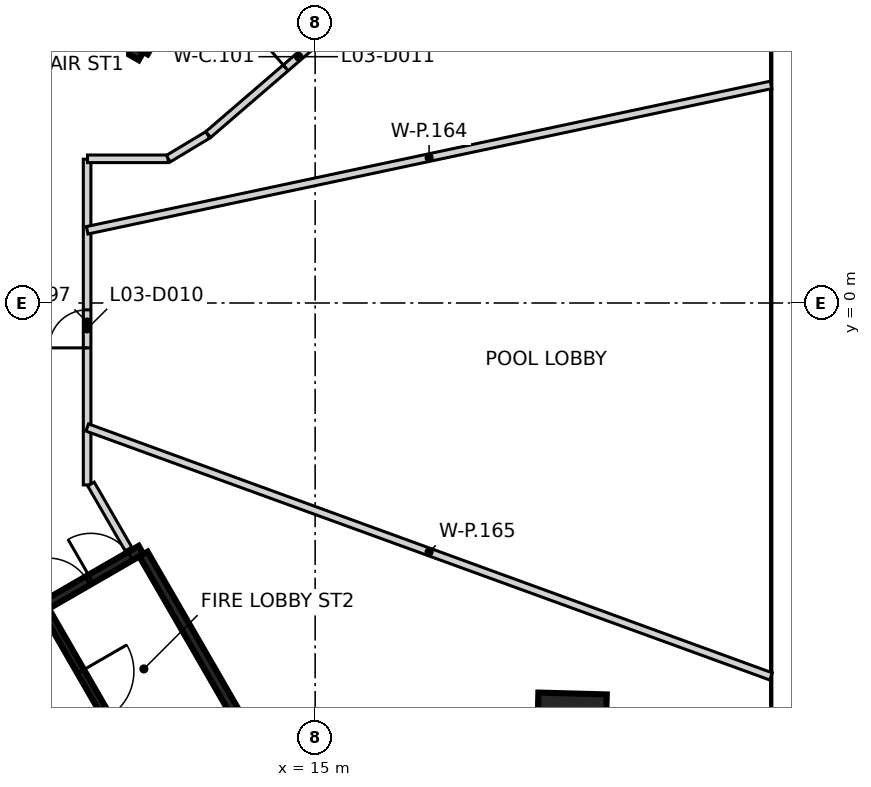
"""IFC4 building model, lengths in metres.
Left out: names, types, materials, properties, quantities, classifications, styles, units other than length and angle.
Written with IfcOpenShell. Run it as: python <this file> out.ifc"""

import sys

from ifc_helpers import new_model, si_unit, direction, frame, frame_2d, origin, origin_2d, place, context, subcontext, project, spatial, rectangle, extrude, element, fill, save


model = new_model("IFC4")
c1 = context("Model", 3, precision=1e-05, world=origin(), true_north=direction((0.0, 1.0)))
c2 = subcontext(c1, "Body", "Model", "MODEL_VIEW")
j1 = project(units=[si_unit("LENGTHUNIT", "METRE"), si_unit("PLANEANGLEUNIT", "RADIAN")], contexts=[c1])
p1 = place(None, origin())
s1 = spatial("IfcSite", under=j1, at=p1, CompositionType="ELEMENT")
p2 = place(p1, origin())
s2 = spatial("IfcBuilding", under=s1, at=p2, CompositionType="ELEMENT")
p3 = place(p2, frame((0.0, 0.0, 19.5)))
s3 = spatial("IfcBuildingStorey", under=s2, at=p3, CompositionType="ELEMENT", Elevation=19.5)
p4 = place(p3, frame((21.749, -11.174, -0.35), z_axis=(0.0, 0.0, 1.0), x_axis=(-0.999628128016, 0.02726913418, 0.0)))
e1 = element("IfcColumn", 1, at=p4, inside=s3, PredefinedType="COLUMN", context=c2, shape_type="SweptSolid", body=[
    extrude(rectangle(XDim=1.8, YDim=1.8, at=origin_2d()), origin(), (0.0, 0.0, 1.0), 2.5),
])
p5 = place(p3, frame((10.42, 6.498, 0.0), z_axis=(0.0, 0.0, 1.0), x_axis=(-0.866021906294, 0.500006057782, 0.0)))
e2 = element("IfcWall", 2, at=p5, inside=s3, PredefinedType="SHEAR", context=c2, shape_type="SweptSolid", body=[
    extrude(rectangle(XDim=11.55, YDim=0.25, at=frame_2d((5.775, 0.0))), origin(), (0.0, 0.0, 1.0), 4.55),
])
p6 = place(p5, frame((10.025, 0.0, 0.0)))
e3 = element("IfcOpeningElement", 3, at=p6, cuts=e2, PredefinedType="OPENING", context=c2, shape_type="SweptSolid", body=[
    extrude(rectangle(XDim=1.2, YDim=2.1, at=frame_2d((0.6, 1.05))), frame((0.0, 0.135, 0.0), z_axis=(0.0, -1.0, 0.0), x_axis=(1.0, 0.0, 0.0)), (0.0, 0.0, 1.0), 0.27),
])
p7 = place(p5, frame((8.725, 0.0, 0.0)))
e4 = element("IfcOpeningElement", 4, at=p7, cuts=e2, PredefinedType="OPENING", context=c2, shape_type="SweptSolid", body=[
    extrude(rectangle(XDim=1.2, YDim=2.1, at=frame_2d((0.6, 1.05))), frame((0.0, 0.135, 0.0), z_axis=(0.0, -1.0, 0.0), x_axis=(1.0, 0.0, 0.0)), (0.0, 0.0, 1.0), 0.27),
])
p8 = place(p3, frame((13.238, 11.378, 0.0), z_axis=(0.0, 0.0, 1.0), x_axis=(-0.500008851346, -0.866020293397, 0.0)))
e5 = element("IfcWall", 5, at=p8, inside=s3, PredefinedType="SHEAR", context=c2, shape_type="SweptSolid", body=[
    extrude(rectangle(XDim=5.51, YDim=0.25, at=frame_2d((2.755, 0.0))), origin(), (0.0, 0.0, 1.0), 4.55),
])
p9 = place(p3, frame((0.417, -12.273, 0.0), z_axis=(0.0, 0.0, 1.0), x_axis=(0.866021906294, 0.500006057782, 0.0)))
e6 = element("IfcWall", 6, at=p9, inside=s3, PredefinedType="SHEAR", context=c2, shape_type="SweptSolid", body=[
    extrude(rectangle(XDim=11.55, YDim=0.25, at=frame_2d((5.775, 0.0))), origin(), (0.0, 0.0, 1.0), 4.55),
])
p10 = place(p9, frame((10.025, 0.0, 0.0)))
e7 = element("IfcOpeningElement", 7, at=p10, cuts=e6, PredefinedType="OPENING", context=c2, shape_type="SweptSolid", body=[
    extrude(rectangle(XDim=1.2, YDim=2.1, at=frame_2d((0.6, 1.05))), frame((0.0, 0.135, 0.0), z_axis=(0.0, -1.0, 0.0), x_axis=(1.0, 0.0, 0.0)), (0.0, 0.0, 1.0), 0.27),
])
p11 = place(p9, frame((8.725, 0.0, 0.0)))
e8 = element("IfcOpeningElement", 8, at=p11, cuts=e6, PredefinedType="OPENING", context=c2, shape_type="SweptSolid", body=[
    extrude(rectangle(XDim=1.2, YDim=2.1, at=frame_2d((0.6, 1.05))), frame((0.0, 0.135, 0.0), z_axis=(0.0, -1.0, 0.0), x_axis=(1.0, 0.0, 0.0)), (0.0, 0.0, 1.0), 0.27),
])
p12 = place(p3, frame((10.483, -6.606, 0.0), z_axis=(0.0, 0.0, 1.0), x_axis=(0.49999885962, -0.866026062182, 0.0)))
e9 = element("IfcWall", 9, at=p12, inside=s3, PredefinedType="SHEAR", context=c2, shape_type="SweptSolid", body=[
    extrude(rectangle(XDim=5.225, YDim=0.25, at=frame_2d((2.612, 0.0))), origin(), (0.0, 0.0, 1.0), 4.55),
])
p13 = place(p3, frame((7.906, -8.094, 0.0), z_axis=(0.0, 0.0, 1.0), x_axis=(0.500024287448, -0.866011380966, 0.0)))
e10 = element("IfcWall", 10, at=p13, inside=s3, PredefinedType="SHEAR", context=c2, shape_type="SweptSolid", body=[
    extrude(rectangle(XDim=5.251, YDim=0.2, at=frame_2d((2.625, 0.0))), origin(), (0.0, 0.0, 1.0), 4.55),
])
p14 = place(p13, frame((1.849, 0.0, 0.0)))
e11 = element("IfcOpeningElement", 11, at=p14, cuts=e10, PredefinedType="OPENING", context=c2, shape_type="SweptSolid", body=[
    extrude(rectangle(XDim=1.4, YDim=2.1, at=frame_2d((0.7, 1.05))), frame((0.0, 0.11, 0.0), z_axis=(0.0, -1.0, 0.0), x_axis=(1.0, 0.0, 0.0)), (0.0, 0.0, 1.0), 0.22),
])
p15 = place(p3, frame((9.0, -4.787, 0.0), z_axis=(0.0, 0.0, 1.0), x_axis=(0.0, 1.0, 0.0)))
e12 = element("IfcWall", 12, at=p15, inside=s3, PredefinedType="PARTITIONING", context=c2, shape_type="SweptSolid", body=[
    extrude(rectangle(XDim=8.571, YDim=0.2, at=frame_2d((4.286, 0.0))), origin(), (0.0, 0.0, 1.0), 4.55),
])
p16 = place(p15, frame((3.606, 0.0, 0.0)))
e13 = element("IfcOpeningElement", 13, at=p16, cuts=e12, PredefinedType="OPENING", context=c2, shape_type="SweptSolid", body=[
    extrude(rectangle(XDim=1.0, YDim=2.1, at=frame_2d((0.5, 1.05))), frame((0.0, 0.11, 0.0), z_axis=(0.0, -1.0, 0.0), x_axis=(1.0, 0.0, 0.0)), (0.0, 0.0, 1.0), 0.22),
])
p17 = place(p3, frame((9.01, 3.794, 0.0), z_axis=(0.0, 0.0, 1.0), x_axis=(1.0, 0.0, 0.0)))
e14 = element("IfcWall", 14, at=p17, inside=s3, PredefinedType="PARTITIONING", context=c2, shape_type="SweptSolid", body=[
    extrude(rectangle(XDim=2.122, YDim=0.2, at=frame_2d((1.061, 0.0))), origin(), (0.0, 0.0, 1.0), 4.55),
])
p18 = place(p3, frame((9.101, -4.763, 0.0), z_axis=(0.0, 0.0, 1.0), x_axis=(0.500150029396, -0.865938766944, 0.0)))
e15 = element("IfcWall", 15, at=p18, inside=s3, PredefinedType="PARTITIONING", context=c2, shape_type="SweptSolid", body=[
    extrude(rectangle(XDim=1.977, YDim=0.2, at=frame_2d((0.989, 0.0))), origin(), (0.0, 0.0, 1.0), 4.55),
])
p19 = place(p3, frame((11.136, 3.797, 0.0), z_axis=(0.0, 0.0, 1.0), x_axis=(0.856568110317, 0.516033983753, 0.0)))
e16 = element("IfcWall", 16, at=p19, inside=s3, PredefinedType="PARTITIONING", context=c2, shape_type="SweptSolid", body=[
    extrude(rectangle(XDim=1.213, YDim=0.2, at=frame_2d((0.606, 0.0))), origin(), (0.0, 0.0, 1.0), 4.55),
])
p20 = place(p3, frame((12.187, 4.433, 0.0), z_axis=(0.0, 0.0, 1.0), x_axis=(0.757945584444, 0.652317783769, 0.0)))
e17 = element("IfcWall", 17, at=p20, inside=s3, PredefinedType="PARTITIONING", context=c2, shape_type="SweptSolid", body=[
    extrude(rectangle(XDim=6.278, YDim=0.2, at=frame_2d((3.139, 0.0))), origin(), (0.0, 0.0, 1.0), 4.55),
])
p21 = place(p20, frame((2.689, 0.0, 0.0)))
e18 = element("IfcOpeningElement", 18, at=p21, cuts=e17, PredefinedType="OPENING", context=c2, shape_type="SweptSolid", body=[
    extrude(rectangle(XDim=0.9, YDim=2.1, at=frame_2d((0.45, 1.05))), frame((0.0, 0.11, 0.0), z_axis=(0.0, -1.0, 0.0), x_axis=(1.0, 0.0, 0.0)), (0.0, 0.0, 1.0), 0.22),
])
p22 = place(p3, frame((9.002, 1.913, 0.0), z_axis=(0.0, 0.0, 1.0), x_axis=(0.978140632744, 0.20794446993, 0.0)))
e19 = element("IfcWall", 19, at=p22, inside=s3, PredefinedType="PARTITIONING", context=c2, shape_type="SweptSolid", body=[
    extrude(rectangle(XDim=18.395, YDim=0.2, at=frame_2d((9.198, 0.0))), origin(), (0.0, 0.0, 1.0), 2.15),
])
p23 = place(p3, frame((9.003, -3.276, 0.0), z_axis=(0.0, 0.0, 1.0), x_axis=(0.93968653248, -0.342036870345, 0.0)))
e20 = element("IfcWall", 20, at=p23, inside=s3, PredefinedType="PARTITIONING", context=c2, shape_type="SweptSolid", body=[
    extrude(rectangle(XDim=19.147, YDim=0.2, at=frame_2d((9.574, 0.0))), origin(), (0.0, 0.0, 1.0), 2.15),
])
p24 = place(p10, origin())
e21 = element("IfcDoor", 21, at=p24, inside=s3, OperationType="SINGLE_SWING_LEFT", PredefinedType="DOOR", context=c2, shape_type="SweptSolid", body=[
    extrude(rectangle(XDim=1.2, YDim=2.1, at=frame_2d((0.6, 1.05))), frame((0.0, 0.025, 0.0), z_axis=(0.0, -1.0, 0.0), x_axis=(1.0, 0.0, 0.0)), (0.0, 0.0, 1.0), 0.05),
])
fill(e7, e21)
p25 = place(p11, origin())
e22 = element("IfcDoor", 22, at=p25, inside=s3, OperationType="SINGLE_SWING_RIGHT", PredefinedType="DOOR", context=c2, shape_type="SweptSolid", body=[
    extrude(rectangle(XDim=1.2, YDim=2.1, at=frame_2d((0.6, 1.05))), frame((0.0, 0.025, 0.0), z_axis=(0.0, -1.0, 0.0), x_axis=(1.0, 0.0, 0.0)), (0.0, 0.0, 1.0), 0.05),
])
fill(e8, e22)
p26 = place(p14, origin())
e23 = element("IfcDoor", 23, at=p26, inside=s3, OperationType="SINGLE_SWING_LEFT", PredefinedType="DOOR", context=c2, shape_type="SweptSolid", body=[
    extrude(rectangle(XDim=1.4, YDim=2.1, at=frame_2d((0.7, 1.05))), frame((0.0, 0.025, 0.0), z_axis=(0.0, -1.0, 0.0), x_axis=(1.0, 0.0, 0.0)), (0.0, 0.0, 1.0), 0.05),
])
fill(e11, e23)
p27 = place(p16, frame((1.0, 0.0, 0.0), z_axis=(0.0, 0.0, 1.0), x_axis=(-1.0, 0.0, 0.0)))
e24 = element("IfcDoor", 24, at=p27, inside=s3, OperationType="SINGLE_SWING_LEFT", PredefinedType="DOOR", context=c2, shape_type="SweptSolid", body=[
    extrude(rectangle(XDim=1.0, YDim=2.1, at=frame_2d((0.5, 1.05))), frame((0.0, 0.025, 0.0), z_axis=(0.0, -1.0, 0.0), x_axis=(1.0, 0.0, 0.0)), (0.0, 0.0, 1.0), 0.05),
])
fill(e13, e24)
p28 = place(p21, frame((0.9, 0.0, 0.0), z_axis=(0.0, 0.0, 1.0), x_axis=(-1.0, 0.0, 0.0)))
e25 = element("IfcDoor", 25, at=p28, inside=s3, OperationType="SINGLE_SWING_LEFT", PredefinedType="DOOR", context=c2, shape_type="SweptSolid", body=[
    extrude(rectangle(XDim=0.9, YDim=2.1, at=frame_2d((0.45, 1.05))), frame((0.0, 0.025, 0.0), z_axis=(0.0, -1.0, 0.0), x_axis=(1.0, 0.0, 0.0)), (0.0, 0.0, 1.0), 0.05),
])
fill(e18, e25)
save(model, sys.argv[1])
